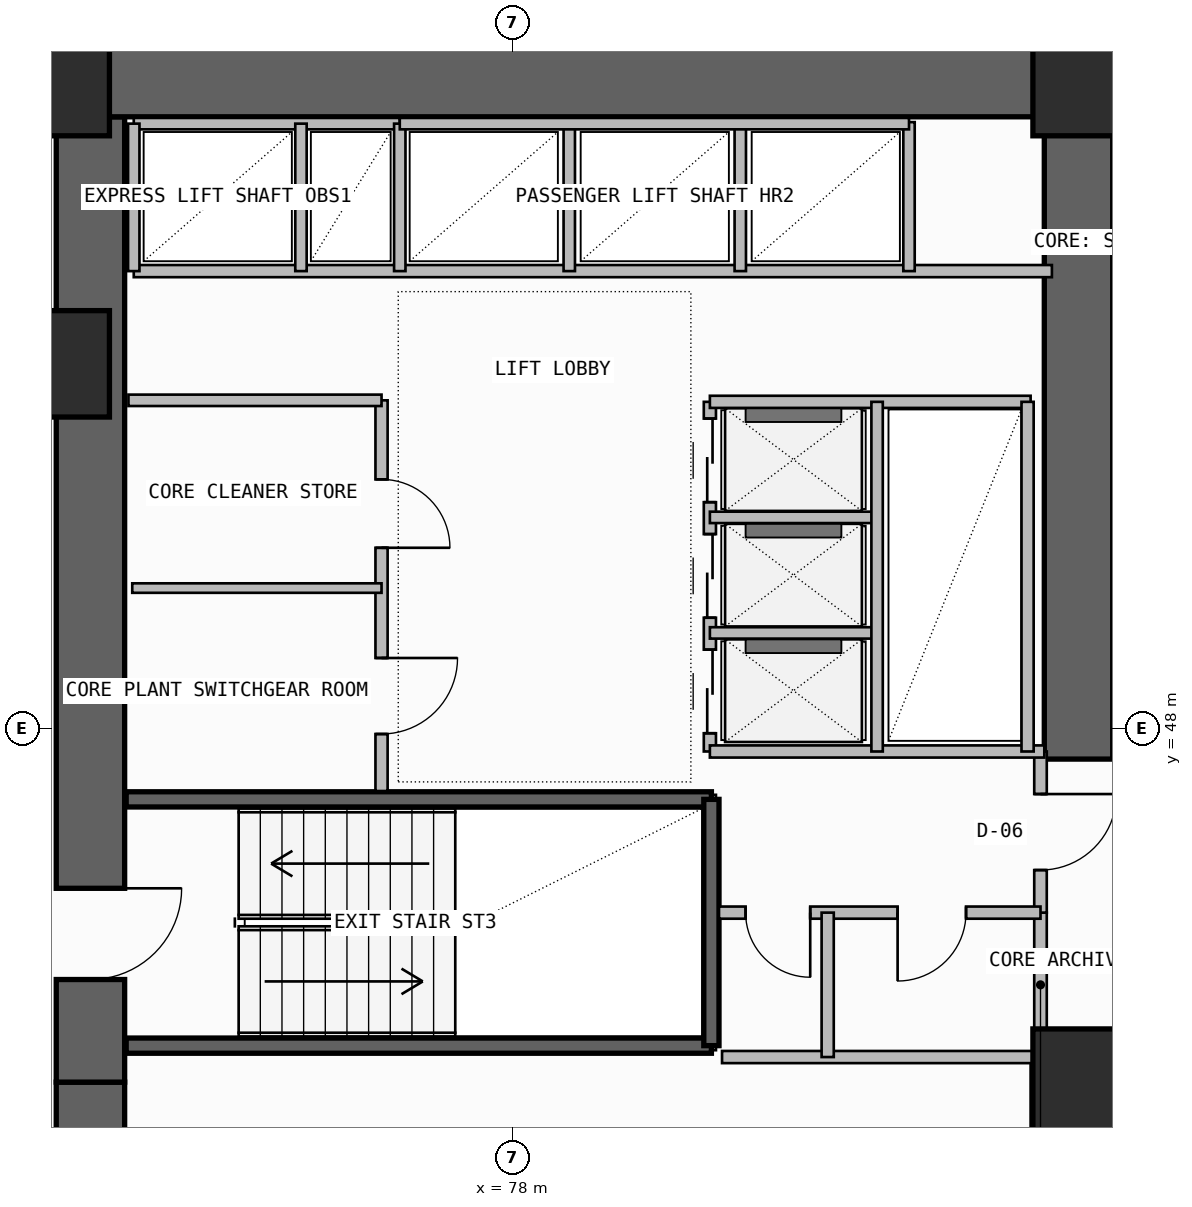
"""IFC4 building model, lengths in metres.
Left out: names, types, materials, properties, quantities, classifications, styles, units other than length and angle.
Written with IfcOpenShell. Run it as: python <this file> out.ifc"""

import sys

from ifc_helpers import new_model, si_unit, direction, frame, frame_2d, origin, origin_2d, place, context, subcontext, project, spatial, rectangle, extrude, element, fill, save


model = new_model("IFC4")
c1 = context("Model", 3, precision=1e-05, world=origin(), true_north=direction((0.0, 1.0)))
c2 = subcontext(c1, "Body", "Model", "MODEL_VIEW")
j1 = project(units=[si_unit("LENGTHUNIT", "METRE"), si_unit("PLANEANGLEUNIT", "RADIAN")], contexts=[c1])
p1 = place(None, origin())
s1 = spatial("IfcSite", under=j1, at=p1, CompositionType="ELEMENT")
p2 = place(p1, origin())
s2 = spatial("IfcBuilding", under=s1, at=p2, CompositionType="ELEMENT")
p3 = place(p2, frame((0.0, 0.0, 117.3)))
s3 = spatial("IfcBuildingStorey", under=s2, at=p3, CompositionType="ELEMENT", Elevation=117.3)
p4 = place(p3, frame((72.45, 35.5, -0.26), z_axis=(0.0, 0.0, 1.0), x_axis=(0.0, 1.0, 0.0)))
e1 = element("IfcWall", 1, at=p4, inside=s3, PredefinedType="SHEAR", context=c2, shape_type="SweptSolid", body=[
    extrude(rectangle(XDim=7.85, YDim=0.9, at=frame_2d((3.925, 0.0))), origin(), (0.0, 0.0, 1.0), 3.6),
])
p5 = place(p4, frame((1.45, 0.0, 0.26)))
e2 = element("IfcOpeningElement", 2, at=p5, cuts=e1, PredefinedType="OPENING", context=c2, shape_type="SweptSolid", body=[
    extrude(rectangle(XDim=1.2, YDim=2.2, at=frame_2d((0.6, 1.1))), frame((0.0, 0.46, 0.0), z_axis=(0.0, -1.0, 0.0), x_axis=(1.0, 0.0, 0.0)), (0.0, 0.0, 1.0), 0.92),
])
p6 = place(p3, frame((72.45, 43.35, -0.26), z_axis=(0.0, 0.0, 1.0), x_axis=(0.0, 1.0, 0.0)))
e3 = element("IfcWall", 3, at=p6, inside=s3, PredefinedType="SHEAR", context=c2, shape_type="SweptSolid", body=[
    extrude(rectangle(XDim=12.7, YDim=0.9, at=frame_2d((6.35, 0.0))), origin(), (0.0, 0.0, 1.0), 3.6),
])
p7 = place(p6, frame((1.35, 0.0, 0.26)))
e4 = element("IfcOpeningElement", 4, at=p7, cuts=e3, PredefinedType="OPENING", context=c2, shape_type="SweptSolid", body=[
    extrude(rectangle(XDim=1.2, YDim=2.2, at=frame_2d((0.6, 1.1))), frame((0.0, 0.46, 0.0), z_axis=(0.0, -1.0, 0.0), x_axis=(1.0, 0.0, 0.0)), (0.0, 0.0, 1.0), 0.92),
])
p8 = place(p3, frame((72.0, 56.5, -0.26), z_axis=(0.0, 0.0, 1.0), x_axis=(1.0, 0.0, 0.0)))
e5 = element("IfcWall", 5, at=p8, inside=s3, PredefinedType="SHEAR", context=c2, shape_type="SweptSolid", body=[
    extrude(rectangle(XDim=13.9, YDim=0.9, at=frame_2d((6.95, 0.0))), origin(), (0.0, 0.0, 1.0), 3.6),
])
p9 = place(p3, frame((85.45, 47.6, -0.26), z_axis=(0.0, 0.0, 1.0), x_axis=(0.0, 1.0, 0.0)))
e6 = element("IfcWall", 6, at=p9, inside=s3, PredefinedType="SHEAR", context=c2, shape_type="SweptSolid", body=[
    extrude(rectangle(XDim=8.45, YDim=0.9, at=frame_2d((4.225, 0.0))), origin(), (0.0, 0.0, 1.0), 3.6),
])
for number, where, z_axis, x_axis in (
    (7, (85.55, 43.35, 0.0), (0.0, 0.0, 1.0), (1.0, 0.0, 0.0)),
    (8, (72.0, 52.8, 0.0), (0.0, 0.0, 1.0), (1.0, 0.0, 0.0)),
    (9, (72.0, 56.5, 0.0), (0.0, 0.0, 1.0), (1.0, 0.0, 0.0)),
    (10, (85.55, 56.5, 0.0), (0.0, 0.0, 1.0), (1.0, 0.0, 0.0)),
):
    element("IfcColumn", number, at=place(p3, frame(where, z_axis=z_axis, x_axis=x_axis)), inside=s3, PredefinedType="COLUMN", context=c2, shape_type="SweptSolid", body=[
        extrude(rectangle(XDim=1.4, YDim=1.4, at=origin_2d()), origin(), (0.0, 0.0, 1.0), 3.6),
    ])
p10 = place(p3, frame((84.92, 38.85, 0.0), z_axis=(0.0, 0.0, 1.0), x_axis=(0.0, 1.0, 0.0)))
e11 = element("IfcWall", 11, at=p10, inside=s3, PredefinedType="SOLIDWALL", context=c2, shape_type="SweptSolid", body=[
    extrude(rectangle(XDim=4.83, YDim=0.2, at=frame_2d((2.415, 0.0))), origin(), (0.0, 0.0, 1.0), 3.34),
])
p11 = place(p10, frame((1.25, 0.0, 0.0)))
e12 = element("IfcOpeningElement", 12, at=p11, cuts=e11, PredefinedType="OPENING", context=c2, shape_type="SweptSolid", body=[
    extrude(rectangle(XDim=1.1, YDim=2.2, at=frame_2d((0.55, 1.1))), frame((0.0, 0.11, 0.0), z_axis=(0.0, -1.0, 0.0), x_axis=(1.0, 0.0, 0.0)), (0.0, 0.0, 1.0), 0.22),
])
for number, where, z_axis, x_axis in (
    (13, (72.92, 43.83, -0.26), (0.0, 0.0, 1.0), (1.0, 0.0, 0.0)),
    (14, (72.92, 47.07, -0.26), (0.0, 0.0, 1.0), (1.0, 0.0, 0.0)),
):
    element("IfcWall", number, at=place(p3, frame(where, z_axis=z_axis, x_axis=x_axis)), inside=s3, PredefinedType="SOLIDWALL", context=c2, shape_type="SweptSolid", body=[
        extrude(rectangle(XDim=7.7, YDim=0.2, at=frame_2d((3.85, 0.0))), origin(), (0.0, 0.0, 1.0), 3.6),
    ])
p12 = place(p3, frame((80.62, 43.83, -0.26), z_axis=(0.0, 0.0, 1.0), x_axis=(0.0, 1.0, 0.0)))
e15 = element("IfcWall", 15, at=p12, inside=s3, PredefinedType="SOLIDWALL", context=c2, shape_type="SweptSolid", body=[
    extrude(rectangle(XDim=3.24, YDim=0.2, at=frame_2d((1.62, 0.0))), origin(), (0.0, 0.0, 1.0), 3.6),
])
p13 = place(p3, frame((84.95, 43.68, 0.0), z_axis=(0.0, 0.0, 1.0), x_axis=(0.0, 1.0, 0.0)))
e16 = element("IfcWall", 16, at=p13, inside=s3, PredefinedType="PLUMBINGWALL", context=c2, shape_type="SweptSolid", body=[
    extrude(rectangle(XDim=1.9, YDim=0.165, at=frame_2d((0.95, 0.0))), origin(), (0.0, 0.0, 1.0), 3.34),
])
p14 = place(p3, frame((84.95, 45.58, 0.0), z_axis=(0.0, 0.0, 1.0), x_axis=(0.0, 1.0, 0.0)))
e17 = element("IfcWall", 17, at=p14, inside=s3, PredefinedType="PARTITIONING", context=c2, shape_type="SweptSolid", body=[
    extrude(rectangle(XDim=2.12, YDim=0.165, at=frame_2d((1.06, 0.0))), origin(), (0.0, 0.0, 1.0), 3.34),
])
p15 = place(p14, frame((0.56, 0.0, 0.0)))
e18 = element("IfcOpeningElement", 18, at=p15, cuts=e17, PredefinedType="OPENING", context=c2, shape_type="SweptSolid", body=[
    extrude(rectangle(XDim=1.0, YDim=2.2, at=frame_2d((0.5, 1.1))), frame((0.0, 0.093, 0.0), z_axis=(0.0, -1.0, 0.0), x_axis=(1.0, 0.0, 0.0)), (0.0, 0.0, 1.0), 0.185),
])
p16 = place(p3, frame((80.72, 45.58, 0.0), z_axis=(0.0, 0.0, 1.0), x_axis=(1.0, 0.0, 0.0)))
e19 = element("IfcWall", 19, at=p16, inside=s3, PredefinedType="PLUMBINGWALL", context=c2, shape_type="SweptSolid", body=[
    extrude(rectangle(XDim=4.23, YDim=0.16, at=frame_2d((2.115, 0.0))), origin(), (0.0, 0.0, 1.0), 3.34),
])
p17 = place(p16, frame((0.35, 0.0, 0.0)))
e20 = element("IfcOpeningElement", 20, at=p17, cuts=e19, PredefinedType="OPENING", context=c2, shape_type="SweptSolid", body=[
    extrude(rectangle(XDim=0.85, YDim=2.05, at=frame_2d((0.425, 1.025))), frame((0.0, 0.09, 0.0), z_axis=(0.0, -1.0, 0.0), x_axis=(1.0, 0.0, 0.0)), (0.0, 0.0, 1.0), 0.18),
])
p18 = place(p16, frame((2.35, 0.0, 0.0)))
e21 = element("IfcOpeningElement", 21, at=p18, cuts=e19, PredefinedType="OPENING", context=c2, shape_type="SweptSolid", body=[
    extrude(rectangle(XDim=0.9, YDim=2.1, at=frame_2d((0.45, 1.05))), frame((0.0, 0.09, 0.0), z_axis=(0.0, -1.0, 0.0), x_axis=(1.0, 0.0, 0.0)), (0.0, 0.0, 1.0), 0.18),
])
p19 = place(p3, frame((80.76, 43.68, 0.0), z_axis=(0.0, 0.0, 1.0), x_axis=(1.0, 0.0, 0.0)))
e22 = element("IfcWall", 22, at=p19, inside=s3, PredefinedType="PLUMBINGWALL", context=c2, shape_type="SweptSolid", body=[
    extrude(rectangle(XDim=4.19, YDim=0.16, at=frame_2d((2.095, 0.0))), origin(), (0.0, 0.0, 1.0), 3.34),
])
p20 = place(p3, frame((82.15, 43.68, 0.0), z_axis=(0.0, 0.0, 1.0), x_axis=(0.0, 1.0, 0.0)))
e23 = element("IfcWall", 23, at=p20, inside=s3, PredefinedType="PLUMBINGWALL", context=c2, shape_type="SweptSolid", body=[
    extrude(rectangle(XDim=1.9, YDim=0.16, at=frame_2d((0.95, 0.0))), origin(), (0.0, 0.0, 1.0), 3.34),
])
p21 = place(p3, frame((76.28, 47.18, 0.0), z_axis=(0.0, 0.0, 1.0), x_axis=(0.0, 1.0, 0.0)))
e24 = element("IfcWall", 24, at=p21, inside=s3, PredefinedType="SOLIDWALL", context=c2, shape_type="SweptSolid", body=[
    extrude(rectangle(XDim=5.14, YDim=0.16, at=frame_2d((2.57, 0.0))), origin(), (0.0, 0.0, 1.0), 3.34),
])
p22 = place(p21, frame((0.75, 0.0, 0.0)))
e25 = element("IfcOpeningElement", 25, at=p22, cuts=e24, PredefinedType="OPENING", context=c2, shape_type="SweptSolid", body=[
    extrude(rectangle(XDim=1.0, YDim=2.2, at=frame_2d((0.5, 1.1))), frame((0.0, 0.09, 0.0), z_axis=(0.0, -1.0, 0.0), x_axis=(1.0, 0.0, 0.0)), (0.0, 0.0, 1.0), 0.18),
])
p23 = place(p21, frame((3.2, 0.0, 0.0)))
e26 = element("IfcOpeningElement", 26, at=p23, cuts=e24, PredefinedType="OPENING", context=c2, shape_type="SweptSolid", body=[
    extrude(rectangle(XDim=0.9, YDim=2.1, at=frame_2d((0.45, 1.05))), frame((0.0, 0.09, 0.0), z_axis=(0.0, -1.0, 0.0), x_axis=(1.0, 0.0, 0.0)), (0.0, 0.0, 1.0), 0.18),
])
p24 = place(p3, frame((72.95, 52.32, 0.0), z_axis=(0.0, 0.0, 1.0), x_axis=(1.0, 0.0, 0.0)))
e27 = element("IfcWall", 27, at=p24, inside=s3, PredefinedType="SOLIDWALL", context=c2, shape_type="SweptSolid", body=[
    extrude(rectangle(XDim=3.33, YDim=0.15, at=frame_2d((1.665, 0.0))), origin(), (0.0, 0.0, 1.0), 3.34),
])
p25 = place(p3, frame((73.0, 49.85, 0.0), z_axis=(0.0, 0.0, 1.0), x_axis=(1.0, 0.0, 0.0)))
e28 = element("IfcWall", 28, at=p25, inside=s3, PredefinedType="PARTITIONING", context=c2, shape_type="SweptSolid", body=[
    extrude(rectangle(XDim=3.28, YDim=0.125, at=frame_2d((1.64, 0.0))), origin(), (0.0, 0.0, 1.0), 3.34),
])
p26 = place(p3, frame((80.6, 47.7, 0.0), z_axis=(0.0, 0.0, 1.0), x_axis=(0.0, 1.0, 0.0)))
e29 = element("IfcWall", 29, at=p26, inside=s3, PredefinedType="SOLIDWALL", context=c2, shape_type="SweptSolid", body=[
    extrude(rectangle(XDim=4.6, YDim=0.16, at=frame_2d((2.3, 0.0))), origin(), (0.0, 0.0, 1.0), 3.34),
])
p27 = place(p26, frame((0.24, 0.0, 0.0)))
e30 = element("IfcOpeningElement", 30, at=p27, cuts=e29, PredefinedType="OPENING", context=c2, shape_type="SweptSolid", body=[
    extrude(rectangle(XDim=1.1, YDim=2.25, at=frame_2d((0.55, 1.125))), frame((0.0, 0.09, 0.0), z_axis=(0.0, -1.0, 0.0), x_axis=(1.0, 0.0, 0.0)), (0.0, 0.0, 1.0), 0.18),
])
p28 = place(p26, frame((1.76, 0.0, 0.0)))
e31 = element("IfcOpeningElement", 31, at=p28, cuts=e29, PredefinedType="OPENING", context=c2, shape_type="SweptSolid", body=[
    extrude(rectangle(XDim=1.1, YDim=2.25, at=frame_2d((0.55, 1.125))), frame((0.0, 0.09, 0.0), z_axis=(0.0, -1.0, 0.0), x_axis=(1.0, 0.0, 0.0)), (0.0, 0.0, 1.0), 0.18),
])
p29 = place(p26, frame((3.28, 0.0, 0.0)))
e32 = element("IfcOpeningElement", 32, at=p29, cuts=e29, PredefinedType="OPENING", context=c2, shape_type="SweptSolid", body=[
    extrude(rectangle(XDim=1.1, YDim=2.25, at=frame_2d((0.55, 1.125))), frame((0.0, 0.09, 0.0), z_axis=(0.0, -1.0, 0.0), x_axis=(1.0, 0.0, 0.0)), (0.0, 0.0, 1.0), 0.18),
])
p30 = place(p3, frame((80.6, 47.7, 0.0), z_axis=(0.0, 0.0, 1.0), x_axis=(1.0, 0.0, 0.0)))
e33 = element("IfcWall", 33, at=p30, inside=s3, PredefinedType="SOLIDWALL", context=c2, shape_type="SweptSolid", body=[
    extrude(rectangle(XDim=4.4, YDim=0.16, at=frame_2d((2.2, 0.0))), origin(), (0.0, 0.0, 1.0), 3.34),
])
p31 = place(p3, frame((80.6, 52.3, 0.0), z_axis=(0.0, 0.0, 1.0), x_axis=(1.0, 0.0, 0.0)))
e34 = element("IfcWall", 34, at=p31, inside=s3, PredefinedType="SOLIDWALL", context=c2, shape_type="SweptSolid", body=[
    extrude(rectangle(XDim=4.22, YDim=0.16, at=frame_2d((2.11, 0.0))), origin(), (0.0, 0.0, 1.0), 3.34),
])
for number, where, z_axis, x_axis in (
    (35, (80.6, 49.26, 0.0), (0.0, 0.0, 1.0), (1.0, 0.0, 0.0)),
    (36, (80.6, 50.78, 0.0), (0.0, 0.0, 1.0), (1.0, 0.0, 0.0)),
):
    element("IfcWall", number, at=place(p3, frame(where, z_axis=z_axis, x_axis=x_axis)), inside=s3, PredefinedType="PLUMBINGWALL", context=c2, shape_type="SweptSolid", body=[
        extrude(rectangle(XDim=2.2, YDim=0.15, at=frame_2d((1.1, 0.0))), origin(), (0.0, 0.0, 1.0), 3.34),
    ])
p32 = place(p3, frame((82.8, 47.7, 0.0), z_axis=(0.0, 0.0, 1.0), x_axis=(0.0, 1.0, 0.0)))
e37 = element("IfcWall", 37, at=p32, inside=s3, PredefinedType="PLUMBINGWALL", context=c2, shape_type="SweptSolid", body=[
    extrude(rectangle(XDim=4.6, YDim=0.15, at=frame_2d((2.3, 0.0))), origin(), (0.0, 0.0, 1.0), 3.34),
])
p33 = place(p3, frame((84.78, 47.7, 0.0), z_axis=(0.0, 0.0, 1.0), x_axis=(0.0, 1.0, 0.0)))
e38 = element("IfcWall", 38, at=p33, inside=s3, PredefinedType="SOLIDWALL", context=c2, shape_type="SweptSolid", body=[
    extrude(rectangle(XDim=4.6, YDim=0.16, at=frame_2d((2.3, 0.0))), origin(), (0.0, 0.0, 1.0), 3.34),
])
p34 = place(p3, frame((73.02, 54.02, 0.0), z_axis=(0.0, 0.0, 1.0), x_axis=(1.0, 0.0, 0.0)))
e39 = element("IfcWall", 39, at=p34, inside=s3, PredefinedType="SOLIDWALL", context=c2, shape_type="SweptSolid", body=[
    extrude(rectangle(XDim=12.08, YDim=0.16, at=frame_2d((6.04, 0.0))), origin(), (0.0, 0.0, 1.0), 3.34),
])
p35 = place(p3, frame((73.02, 55.96, 0.0), z_axis=(0.0, 0.0, 1.0), x_axis=(1.0, 0.0, 0.0)))
e40 = element("IfcWall", 40, at=p35, inside=s3, PredefinedType="SOLIDWALL", context=c2, shape_type="SweptSolid", body=[
    extrude(rectangle(XDim=3.5, YDim=0.15, at=frame_2d((1.75, 0.0))), origin(), (0.0, 0.0, 1.0), 3.34),
])
p36 = place(p3, frame((73.02, 54.02, 0.0), z_axis=(0.0, 0.0, 1.0), x_axis=(0.0, 1.0, 0.0)))
e41 = element("IfcWall", 41, at=p36, inside=s3, PredefinedType="PLUMBINGWALL", context=c2, shape_type="SweptSolid", body=[
    extrude(rectangle(XDim=1.94, YDim=0.15, at=frame_2d((0.97, 0.0))), origin(), (0.0, 0.0, 1.0), 3.34),
])
p37 = place(p3, frame((76.52, 54.02, 0.0), z_axis=(0.0, 0.0, 1.0), x_axis=(0.0, 1.0, 0.0)))
e42 = element("IfcWall", 42, at=p37, inside=s3, PredefinedType="SOLIDWALL", context=c2, shape_type="SweptSolid", body=[
    extrude(rectangle(XDim=1.94, YDim=0.15, at=frame_2d((0.97, 0.0))), origin(), (0.0, 0.0, 1.0), 3.34),
])
p38 = place(p3, frame((75.22, 54.02, 0.0), z_axis=(0.0, 0.0, 1.0), x_axis=(0.0, 1.0, 0.0)))
e43 = element("IfcWall", 43, at=p38, inside=s3, PredefinedType="PLUMBINGWALL", context=c2, shape_type="SweptSolid", body=[
    extrude(rectangle(XDim=1.94, YDim=0.15, at=frame_2d((0.97, 0.0))), origin(), (0.0, 0.0, 1.0), 3.34),
])
for number, where, z_axis, x_axis in (
    (44, (78.75, 54.02, 0.0), (0.0, 0.0, 1.0), (0.0, 1.0, 0.0)),
    (45, (81.0, 54.02, 0.0), (0.0, 0.0, 1.0), (0.0, 1.0, 0.0)),
):
    element("IfcWall", number, at=place(p3, frame(where, z_axis=z_axis, x_axis=x_axis)), inside=s3, PredefinedType="PLUMBINGWALL", context=c2, shape_type="SweptSolid", body=[
        extrude(rectangle(XDim=1.96, YDim=0.15, at=frame_2d((0.98, 0.0))), origin(), (0.0, 0.0, 1.0), 3.34),
    ])
p39 = place(p3, frame((83.22, 54.02, 0.0), z_axis=(0.0, 0.0, 1.0), x_axis=(0.0, 1.0, 0.0)))
e46 = element("IfcWall", 46, at=p39, inside=s3, PredefinedType="SOLIDWALL", context=c2, shape_type="SweptSolid", body=[
    extrude(rectangle(XDim=1.96, YDim=0.15, at=frame_2d((0.98, 0.0))), origin(), (0.0, 0.0, 1.0), 3.34),
])
p40 = place(p3, frame((76.52, 55.96, 0.0), z_axis=(0.0, 0.0, 1.0), x_axis=(1.0, 0.0, 0.0)))
e47 = element("IfcWall", 47, at=p40, inside=s3, PredefinedType="SOLIDWALL", context=c2, shape_type="SweptSolid", body=[
    extrude(rectangle(XDim=6.7, YDim=0.15, at=frame_2d((3.35, 0.0))), origin(), (0.0, 0.0, 1.0), 3.34),
])
p41 = place(p7, frame((1.2, 0.0, 0.0), z_axis=(0.0, 0.0, 1.0), x_axis=(-1.0, 0.0, 0.0)))
e48 = element("IfcDoor", 48, at=p41, inside=s3, OperationType="SINGLE_SWING_LEFT", PredefinedType="USERDEFINED", context=c2, shape_type="SweptSolid", body=[
    extrude(rectangle(XDim=1.2, YDim=2.2, at=frame_2d((0.6, 1.1))), frame((0.0, 0.025, 0.0), z_axis=(0.0, -1.0, 0.0), x_axis=(1.0, 0.0, 0.0)), (0.0, 0.0, 1.0), 0.05),
])
fill(e4, e48)
p42 = place(p15, frame((1.0, 0.0, 0.0), z_axis=(0.0, 0.0, 1.0), x_axis=(-1.0, 0.0, 0.0)))
e49 = element("IfcDoor", 49, at=p42, inside=s3, OperationType="SINGLE_SWING_LEFT", PredefinedType="DOOR", context=c2, shape_type="SweptSolid", body=[
    extrude(rectangle(XDim=1.0, YDim=2.2, at=frame_2d((0.5, 1.1))), frame((0.0, 0.025, 0.0), z_axis=(0.0, -1.0, 0.0), x_axis=(1.0, 0.0, 0.0)), (0.0, 0.0, 1.0), 0.05),
])
fill(e18, e49)
p43 = place(p17, frame((0.85, 0.0, 0.0), z_axis=(0.0, 0.0, 1.0), x_axis=(-1.0, 0.0, 0.0)))
e50 = element("IfcDoor", 50, at=p43, inside=s3, OperationType="SINGLE_SWING_LEFT", PredefinedType="DOOR", context=c2, shape_type="SweptSolid", body=[
    extrude(rectangle(XDim=0.85, YDim=2.05, at=frame_2d((0.425, 1.025))), frame((0.0, 0.025, 0.0), z_axis=(0.0, -1.0, 0.0), x_axis=(1.0, 0.0, 0.0)), (0.0, 0.0, 1.0), 0.05),
])
fill(e20, e50)
p44 = place(p18, frame((0.9, 0.0, 0.0), z_axis=(0.0, 0.0, 1.0), x_axis=(-1.0, 0.0, 0.0)))
e51 = element("IfcDoor", 51, at=p44, inside=s3, OperationType="SINGLE_SWING_RIGHT", PredefinedType="DOOR", context=c2, shape_type="SweptSolid", body=[
    extrude(rectangle(XDim=0.9, YDim=2.1, at=frame_2d((0.45, 1.05))), frame((0.0, 0.025, 0.0), z_axis=(0.0, -1.0, 0.0), x_axis=(1.0, 0.0, 0.0)), (0.0, 0.0, 1.0), 0.05),
])
fill(e21, e51)
p45 = place(p22, frame((1.0, 0.0, 0.0), z_axis=(0.0, 0.0, 1.0), x_axis=(-1.0, 0.0, 0.0)))
e52 = element("IfcDoor", 52, at=p45, inside=s3, OperationType="SINGLE_SWING_LEFT", PredefinedType="DOOR", context=c2, shape_type="SweptSolid", body=[
    extrude(rectangle(XDim=1.0, YDim=2.2, at=frame_2d((0.5, 1.1))), frame((0.0, 0.025, 0.0), z_axis=(0.0, -1.0, 0.0), x_axis=(1.0, 0.0, 0.0)), (0.0, 0.0, 1.0), 0.05),
])
fill(e25, e52)
p46 = place(p23, frame((0.9, 0.0, 0.0), z_axis=(0.0, 0.0, 1.0), x_axis=(-1.0, 0.0, 0.0)))
e53 = element("IfcDoor", 53, at=p46, inside=s3, OperationType="SINGLE_SWING_RIGHT", PredefinedType="DOOR", context=c2, shape_type="SweptSolid", body=[
    extrude(rectangle(XDim=0.9, YDim=2.1, at=frame_2d((0.45, 1.05))), frame((0.0, 0.025, 0.0), z_axis=(0.0, -1.0, 0.0), x_axis=(1.0, 0.0, 0.0)), (0.0, 0.0, 1.0), 0.05),
])
fill(e26, e53)
p47 = place(p27, frame((1.1, 0.0, 0.0), z_axis=(0.0, 0.0, 1.0), x_axis=(-1.0, 0.0, 0.0)))
e54 = element("IfcDoor", 54, at=p47, inside=s3, OperationType="DOUBLE_DOOR_SLIDING", PredefinedType="DOOR", context=c2, shape_type="SweptSolid", body=[
    extrude(rectangle(XDim=1.1, YDim=2.25, at=frame_2d((0.55, 1.125))), frame((0.0, 0.025, 0.0), z_axis=(0.0, -1.0, 0.0), x_axis=(1.0, 0.0, 0.0)), (0.0, 0.0, 1.0), 0.05),
])
fill(e30, e54)
p48 = place(p28, frame((1.1, 0.0, 0.0), z_axis=(0.0, 0.0, 1.0), x_axis=(-1.0, 0.0, 0.0)))
e55 = element("IfcDoor", 55, at=p48, inside=s3, OperationType="DOUBLE_DOOR_SLIDING", PredefinedType="DOOR", context=c2, shape_type="SweptSolid", body=[
    extrude(rectangle(XDim=1.1, YDim=2.25, at=frame_2d((0.55, 1.125))), frame((0.0, 0.025, 0.0), z_axis=(0.0, -1.0, 0.0), x_axis=(1.0, 0.0, 0.0)), (0.0, 0.0, 1.0), 0.05),
])
fill(e31, e55)
p49 = place(p29, frame((1.1, 0.0, 0.0), z_axis=(0.0, 0.0, 1.0), x_axis=(-1.0, 0.0, 0.0)))
e56 = element("IfcDoor", 56, at=p49, inside=s3, OperationType="DOUBLE_DOOR_SLIDING", PredefinedType="DOOR", context=c2, shape_type="SweptSolid", body=[
    extrude(rectangle(XDim=1.1, YDim=2.25, at=frame_2d((0.55, 1.125))), frame((0.0, 0.025, 0.0), z_axis=(0.0, -1.0, 0.0), x_axis=(1.0, 0.0, 0.0)), (0.0, 0.0, 1.0), 0.05),
])
fill(e32, e56)
save(model, sys.argv[1])
